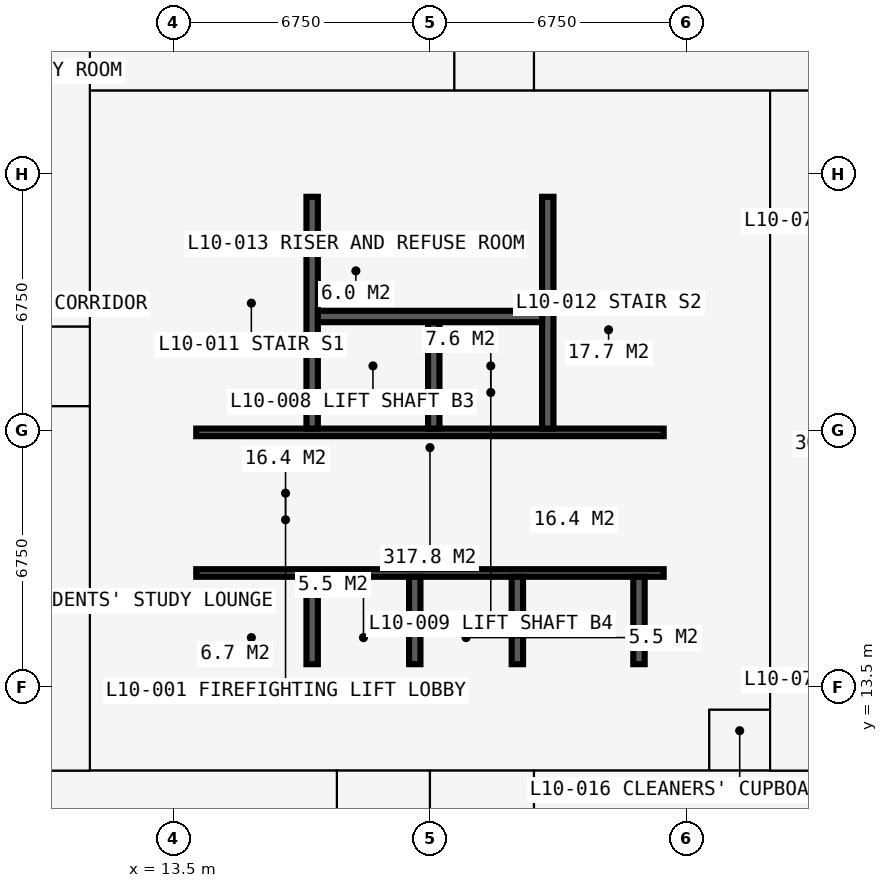
"""IFC4 building model, lengths in metres.
Left out: names, types, materials, properties, quantities, classifications, styles, units other than length and angle.
Written with IfcOpenShell. Run it as: python <this file> out.ifc"""

import sys

from ifc_helpers import new_model, si_unit, direction, frame, frame_2d, origin, place, context, subcontext, project, spatial, rectangle, extrude, element, fill, save


model = new_model("IFC4")
c1 = context("Model", 3, precision=1e-05, world=origin(), true_north=direction((0.0, 1.0)))
c2 = subcontext(c1, "Body", "Model", "MODEL_VIEW")
j1 = project(units=[si_unit("LENGTHUNIT", "METRE"), si_unit("PLANEANGLEUNIT", "RADIAN")], contexts=[c1])
p1 = place(None, origin())
s1 = spatial("IfcSite", under=j1, at=p1, CompositionType="ELEMENT")
p2 = place(p1, origin())
s2 = spatial("IfcBuilding", under=s1, at=p2, CompositionType="ELEMENT")
p3 = place(p2, frame((0.0, 0.0, 39.6)))
s3 = spatial("IfcBuildingStorey", under=s2, at=p3, CompositionType="ELEMENT", Elevation=39.6)
p4 = place(p3, frame((12.9, 13.5, 0.0), z_axis=(0.0, 0.0, 1.0), x_axis=(1.0, 0.0, 0.0)))
e1 = element("IfcWall", 1, at=p4, inside=s3, PredefinedType="SHEAR", context=c2, shape_type="SweptSolid", body=[
    extrude(rectangle(XDim=14.7, YDim=1.2, at=frame_2d((7.35, 0.0))), origin(), (0.0, 0.0, 1.0), 3.6),
])
p5 = place(p3, frame((27.0, 14.1, 0.0), z_axis=(0.0, 0.0, 1.0), x_axis=(0.0, 1.0, 0.0)))
e2 = element("IfcWall", 2, at=p5, inside=s3, PredefinedType="SHEAR", context=c2, shape_type="SweptSolid", body=[
    extrude(rectangle(XDim=12.3, YDim=1.2, at=frame_2d((6.15, 0.0))), origin(), (0.0, 0.0, 1.0), 3.6),
])
p6 = place(p5, frame((3.65, 0.0, 0.0)))
e3 = element("IfcOpeningElement", 3, at=p6, cuts=e2, PredefinedType="OPENING", context=c2, shape_type="SweptSolid", body=[
    extrude(rectangle(XDim=1.2, YDim=2.2, at=frame_2d((0.6, 1.1))), frame((0.0, 0.61, 0.0), z_axis=(0.0, -1.0, 0.0), x_axis=(1.0, 0.0, 0.0)), (0.0, 0.0, 1.0), 1.22),
])
p7 = place(p3, frame((27.6, 27.0, 0.0), z_axis=(0.0, 0.0, 1.0), x_axis=(-1.0, 0.0, 0.0)))
e4 = element("IfcWall", 4, at=p7, inside=s3, PredefinedType="SHEAR", context=c2, shape_type="SweptSolid", body=[
    extrude(rectangle(XDim=14.7, YDim=1.2, at=frame_2d((7.35, 0.0))), origin(), (0.0, 0.0, 1.0), 3.6),
])
p8 = place(p7, frame((5.225, 0.0, 0.0)))
e5 = element("IfcOpeningElement", 5, at=p8, cuts=e4, PredefinedType="OPENING", context=c2, shape_type="SweptSolid", body=[
    extrude(rectangle(XDim=0.9, YDim=2.2, at=frame_2d((0.45, 1.1))), frame((0.0, 0.61, 0.0), z_axis=(0.0, -1.0, 0.0), x_axis=(1.0, 0.0, 0.0)), (0.0, 0.0, 1.0), 1.22),
])
p9 = place(p7, frame((8.2, 0.0, 0.0)))
e6 = element("IfcOpeningElement", 6, at=p9, cuts=e4, PredefinedType="OPENING", context=c2, shape_type="SweptSolid", body=[
    extrude(rectangle(XDim=1.0, YDim=2.2, at=frame_2d((0.5, 1.1))), frame((0.0, 0.61, 0.0), z_axis=(0.0, -1.0, 0.0), x_axis=(1.0, 0.0, 0.0)), (0.0, 0.0, 1.0), 1.22),
])
p10 = place(p3, frame((13.5, 26.4, 0.0), z_axis=(0.0, 0.0, 1.0), x_axis=(0.0, -1.0, 0.0)))
e7 = element("IfcWall", 7, at=p10, inside=s3, PredefinedType="SHEAR", context=c2, shape_type="SweptSolid", body=[
    extrude(rectangle(XDim=12.3, YDim=1.2, at=frame_2d((6.15, 0.0))), origin(), (0.0, 0.0, 1.0), 3.6),
])
p11 = place(p10, frame((7.45, 0.0, 0.0)))
e8 = element("IfcOpeningElement", 8, at=p11, cuts=e7, PredefinedType="OPENING", context=c2, shape_type="SweptSolid", body=[
    extrude(rectangle(XDim=1.2, YDim=2.2, at=frame_2d((0.6, 1.1))), frame((0.0, 0.61, 0.0), z_axis=(0.0, -1.0, 0.0), x_axis=(1.0, 0.0, 0.0)), (0.0, 0.0, 1.0), 1.22),
])
p12 = place(p3, frame((14.1, 16.5, 0.0), z_axis=(0.0, 0.0, 1.0), x_axis=(1.0, 0.0, 0.0)))
e9 = element("IfcWall", 9, at=p12, inside=s3, PredefinedType="SHEAR", context=c2, shape_type="SweptSolid", body=[
    extrude(rectangle(XDim=12.3, YDim=0.2, at=frame_2d((6.15, 0.0))), origin(), (0.0, 0.0, 1.0), 3.6),
])
p13 = place(p12, frame((0.9, 0.0, 0.0)))
e10 = element("IfcOpeningElement", 10, at=p13, cuts=e9, PredefinedType="OPENING", context=c2, shape_type="SweptSolid", body=[
    extrude(rectangle(XDim=1.1, YDim=2.2, at=frame_2d((0.55, 1.1))), frame((0.0, 0.11, 0.0), z_axis=(0.0, -1.0, 0.0), x_axis=(1.0, 0.0, 0.0)), (0.0, 0.0, 1.0), 0.22),
])
p14 = place(p12, frame((9.5, 0.0, 0.0)))
e11 = element("IfcOpeningElement", 11, at=p14, cuts=e9, PredefinedType="OPENING", context=c2, shape_type="SweptSolid", body=[
    extrude(rectangle(XDim=1.1, YDim=2.2, at=frame_2d((0.55, 1.1))), frame((0.0, 0.11, 0.0), z_axis=(0.0, -1.0, 0.0), x_axis=(1.0, 0.0, 0.0)), (0.0, 0.0, 1.0), 0.22),
])
p15 = place(p3, frame((14.1, 20.2, 0.0), z_axis=(0.0, 0.0, 1.0), x_axis=(1.0, 0.0, 0.0)))
e12 = element("IfcWall", 12, at=p15, inside=s3, PredefinedType="SHEAR", context=c2, shape_type="SweptSolid", body=[
    extrude(rectangle(XDim=12.3, YDim=0.2, at=frame_2d((6.15, 0.0))), origin(), (0.0, 0.0, 1.0), 3.6),
])
p16 = place(p15, frame((0.35, 0.0, 0.0)))
e13 = element("IfcOpeningElement", 13, at=p16, cuts=e12, PredefinedType="OPENING", context=c2, shape_type="SweptSolid", body=[
    extrude(rectangle(XDim=1.1, YDim=2.2, at=frame_2d((0.55, 1.1))), frame((0.0, 0.11, 0.0), z_axis=(0.0, -1.0, 0.0), x_axis=(1.0, 0.0, 0.0)), (0.0, 0.0, 1.0), 0.22),
])
p17 = place(p15, frame((9.75, 0.0, 0.0)))
e14 = element("IfcOpeningElement", 14, at=p17, cuts=e12, PredefinedType="OPENING", context=c2, shape_type="SweptSolid", body=[
    extrude(rectangle(XDim=1.1, YDim=2.2, at=frame_2d((0.55, 1.1))), frame((0.0, 0.11, 0.0), z_axis=(0.0, -1.0, 0.0), x_axis=(1.0, 0.0, 0.0)), (0.0, 0.0, 1.0), 0.22),
])
for number, where, z_axis, x_axis in (
    (15, (17.15, 20.3, 0.0), (0.0, 0.0, 1.0), (0.0, 1.0, 0.0)),
    (16, (23.35, 20.3, 0.0), (0.0, 0.0, 1.0), (0.0, 1.0, 0.0)),
):
    element("IfcWall", number, at=place(p3, frame(where, z_axis=z_axis, x_axis=x_axis)), inside=s3, PredefinedType="SHEAR", context=c2, shape_type="SweptSolid", body=[
        extrude(rectangle(XDim=6.1, YDim=0.3, at=frame_2d((3.05, 0.0))), origin(), (0.0, 0.0, 1.0), 3.6),
    ])
p18 = place(p3, frame((20.35, 20.3, 0.0), z_axis=(0.0, 0.0, 1.0), x_axis=(0.0, 1.0, 0.0)))
e17 = element("IfcWall", 17, at=p18, inside=s3, PredefinedType="SHEAR", context=c2, shape_type="SweptSolid", body=[
    extrude(rectangle(XDim=2.8, YDim=0.3, at=frame_2d((1.4, 0.0))), origin(), (0.0, 0.0, 1.0), 3.6),
])
p19 = place(p3, frame((17.3, 23.25, 0.0), z_axis=(0.0, 0.0, 1.0), x_axis=(1.0, 0.0, 0.0)))
e18 = element("IfcWall", 18, at=p19, inside=s3, PredefinedType="SHEAR", context=c2, shape_type="SweptSolid", body=[
    extrude(rectangle(XDim=5.9, YDim=0.3, at=frame_2d((2.95, 0.0))), origin(), (0.0, 0.0, 1.0), 3.6),
])
for number, where, z_axis, x_axis in (
    (19, (17.15, 14.1, 0.0), (0.0, 0.0, 1.0), (0.0, 1.0, 0.0)),
    (20, (19.85, 14.1, 0.0), (0.0, 0.0, 1.0), (0.0, 1.0, 0.0)),
    (21, (22.55, 14.1, 0.0), (0.0, 0.0, 1.0), (0.0, 1.0, 0.0)),
    (22, (25.75, 14.1, 0.0), (0.0, 0.0, 1.0), (0.0, 1.0, 0.0)),
):
    element("IfcWall", number, at=place(p3, frame(where, z_axis=z_axis, x_axis=x_axis)), inside=s3, PredefinedType="SHEAR", context=c2, shape_type="SweptSolid", body=[
        extrude(rectangle(XDim=2.3, YDim=0.3, at=frame_2d((1.15, 0.0))), origin(), (0.0, 0.0, 1.0), 3.6),
    ])
p20 = place(p3, frame((18.875, 16.6, 0.0), z_axis=(0.0, 0.0, 1.0), x_axis=(0.0, 1.0, 0.0)))
e23 = element("IfcWall", 23, at=p20, inside=s3, PredefinedType="PARTITIONING", context=c2, shape_type="SweptSolid", body=[
    extrude(rectangle(XDim=3.5, YDim=0.15, at=frame_2d((1.75, 0.0))), origin(), (0.0, 0.0, 1.0), 3.375),
])
p21 = place(p20, frame((1.15, 0.0, 0.0)))
e24 = element("IfcOpeningElement", 24, at=p21, cuts=e23, PredefinedType="OPENING", context=c2, shape_type="SweptSolid", body=[
    extrude(rectangle(XDim=1.2, YDim=2.2, at=frame_2d((0.6, 1.1))), frame((0.0, 0.085, 0.0), z_axis=(0.0, -1.0, 0.0), x_axis=(1.0, 0.0, 0.0)), (0.0, 0.0, 1.0), 0.17),
])
p22 = place(p3, frame((21.625, 16.6, 0.0), z_axis=(0.0, 0.0, 1.0), x_axis=(0.0, 1.0, 0.0)))
e25 = element("IfcWall", 25, at=p22, inside=s3, PredefinedType="PARTITIONING", context=c2, shape_type="SweptSolid", body=[
    extrude(rectangle(XDim=3.5, YDim=0.15, at=frame_2d((1.75, 0.0))), origin(), (0.0, 0.0, 1.0), 3.375),
])
p23 = place(p22, frame((1.15, 0.0, 0.0)))
e26 = element("IfcOpeningElement", 26, at=p23, cuts=e25, PredefinedType="OPENING", context=c2, shape_type="SweptSolid", body=[
    extrude(rectangle(XDim=1.2, YDim=2.2, at=frame_2d((0.6, 1.1))), frame((0.0, 0.085, 0.0), z_axis=(0.0, -1.0, 0.0), x_axis=(1.0, 0.0, 0.0)), (0.0, 0.0, 1.0), 0.17),
])
p24 = place(p3, frame((19.375, 23.4, 0.0), z_axis=(0.0, 0.0, 1.0), x_axis=(0.0, 1.0, 0.0)))
e27 = element("IfcWall", 27, at=p24, inside=s3, PredefinedType="PARTITIONING", context=c2, shape_type="SweptSolid", body=[
    extrude(rectangle(XDim=3.0, YDim=0.15, at=frame_2d((1.5, 0.0))), origin(), (0.0, 0.0, 1.0), 3.375),
])
for number, where, z_axis, x_axis in (
    (28, (5.65, 20.887, 0.0), (0.0, 0.0, 1.0), (1.0, 0.0, 0.0)),
    (29, (5.65, 22.988, 0.0), (0.0, 0.0, 1.0), (1.0, 0.0, 0.0)),
):
    element("IfcWall", number, at=place(p3, frame(where, z_axis=z_axis, x_axis=x_axis)), inside=s3, PredefinedType="PARTITIONING", context=c2, shape_type="SweptSolid", body=[
        extrude(rectangle(XDim=5.65, YDim=0.15, at=frame_2d((2.825, 0.0))), origin(), (0.0, 0.0, 1.0), 3.375),
    ])
p25 = place(p3, frame((10.125, 11.3, 0.0), z_axis=(0.0, 0.0, 1.0), x_axis=(1.0, 0.0, 0.0)))
e30 = element("IfcWall", 30, at=p25, inside=s3, PredefinedType="PARTITIONING", context=c2, shape_type="SweptSolid", body=[
    extrude(rectangle(XDim=20.675, YDim=0.15, at=frame_2d((10.337, 0.0))), origin(), (0.0, 0.0, 1.0), 3.375),
])
p26 = place(p25, frame((8.375, 0.0, 0.0)))
e31 = element("IfcOpeningElement", 31, at=p26, cuts=e30, PredefinedType="OPENING", context=c2, shape_type="SweptSolid", body=[
    extrude(rectangle(XDim=1.0, YDim=2.2, at=frame_2d((0.5, 1.1))), frame((0.0, 0.085, 0.0), z_axis=(0.0, -1.0, 0.0), x_axis=(1.0, 0.0, 0.0)), (0.0, 0.0, 1.0), 0.17),
])
p27 = place(p25, frame((10.975, 0.0, 0.0)))
e32 = element("IfcOpeningElement", 32, at=p27, cuts=e30, PredefinedType="OPENING", context=c2, shape_type="SweptSolid", body=[
    extrude(rectangle(XDim=1.0, YDim=2.2, at=frame_2d((0.5, 1.1))), frame((0.0, 0.085, 0.0), z_axis=(0.0, -1.0, 0.0), x_axis=(1.0, 0.0, 0.0)), (0.0, 0.0, 1.0), 0.17),
])
p28 = place(p25, frame((3.925, 0.0, 0.0)))
e33 = element("IfcOpeningElement", 33, at=p28, cuts=e30, PredefinedType="OPENING", context=c2, shape_type="SweptSolid", body=[
    extrude(rectangle(XDim=0.95, YDim=2.2, at=frame_2d((0.475, 1.1))), frame((0.0, 0.085, 0.0), z_axis=(0.0, -1.0, 0.0), x_axis=(1.0, 0.0, 0.0)), (0.0, 0.0, 1.0), 0.17),
])
p29 = place(p3, frame((11.3, 11.3, 0.0), z_axis=(0.0, 0.0, 1.0), x_axis=(0.0, 1.0, 0.0)))
e34 = element("IfcWall", 34, at=p29, inside=s3, PredefinedType="PARTITIONING", context=c2, shape_type="SweptSolid", body=[
    extrude(rectangle(XDim=19.075, YDim=0.15, at=frame_2d((9.538, 0.0))), origin(), (0.0, 0.0, 1.0), 3.375),
])
p30 = place(p29, frame((10.137, 0.0, 0.0)))
e35 = element("IfcOpeningElement", 35, at=p30, cuts=e34, PredefinedType="OPENING", context=c2, shape_type="SweptSolid", body=[
    extrude(rectangle(XDim=1.0, YDim=2.2, at=frame_2d((0.5, 1.1))), frame((0.0, 0.085, 0.0), z_axis=(0.0, -1.0, 0.0), x_axis=(1.0, 0.0, 0.0)), (0.0, 0.0, 1.0), 0.17),
])
p31 = place(p3, frame((11.3, 29.2, 0.0), z_axis=(0.0, 0.0, 1.0), x_axis=(1.0, 0.0, 0.0)))
e36 = element("IfcWall", 36, at=p31, inside=s3, PredefinedType="PARTITIONING", context=c2, shape_type="SweptSolid", body=[
    extrude(rectangle(XDim=19.075, YDim=0.15, at=frame_2d((9.538, 0.0))), origin(), (0.0, 0.0, 1.0), 3.375),
])
p32 = place(p31, frame((10.137, 0.0, 0.0)))
e37 = element("IfcOpeningElement", 37, at=p32, cuts=e36, PredefinedType="OPENING", context=c2, shape_type="SweptSolid", body=[
    extrude(rectangle(XDim=1.0, YDim=2.2, at=frame_2d((0.5, 1.1))), frame((0.0, 0.085, 0.0), z_axis=(0.0, -1.0, 0.0), x_axis=(1.0, 0.0, 0.0)), (0.0, 0.0, 1.0), 0.17),
])
p33 = place(p3, frame((17.8, 5.65, 0.0), z_axis=(0.0, 0.0, 1.0), x_axis=(0.0, 1.0, 0.0)))
e38 = element("IfcWall", 38, at=p33, inside=s3, PredefinedType="PARTITIONING", context=c2, shape_type="SweptSolid", body=[
    extrude(rectangle(XDim=5.65, YDim=0.15, at=frame_2d((2.825, 0.0))), origin(), (0.0, 0.0, 1.0), 3.375),
])
p34 = place(p3, frame((20.25, -0.734, 0.0), z_axis=(0.0, 0.0, 1.0), x_axis=(0.0, 1.0, 0.0)))
e39 = element("IfcWall", 39, at=p34, inside=s3, PredefinedType="PARTITIONING", context=c2, shape_type="SweptSolid", body=[
    extrude(rectangle(XDim=12.034, YDim=0.15, at=frame_2d((6.017, 0.0))), origin(), (0.0, 0.0, 1.0), 2.61),
])
for number, where, z_axis, x_axis in (
    (40, (20.887, 29.2, 0.0), (0.0, 0.0, 1.0), (0.0, 1.0, 0.0)),
    (41, (22.988, 5.65, 0.0), (0.0, 0.0, 1.0), (0.0, 1.0, 0.0)),
    (42, (22.988, 29.2, 0.0), (0.0, 0.0, 1.0), (0.0, 1.0, 0.0)),
):
    element("IfcWall", number, at=place(p3, frame(where, z_axis=z_axis, x_axis=x_axis)), inside=s3, PredefinedType="PARTITIONING", context=c2, shape_type="SweptSolid", body=[
        extrude(rectangle(XDim=5.65, YDim=0.15, at=frame_2d((2.825, 0.0))), origin(), (0.0, 0.0, 1.0), 3.375),
    ])
p35 = place(p3, frame((27.6, 11.3, 0.0), z_axis=(0.0, 0.0, 1.0), x_axis=(0.0, 1.0, 0.0)))
e43 = element("IfcWall", 43, at=p35, inside=s3, PredefinedType="PARTITIONING", context=c2, shape_type="SweptSolid", body=[
    extrude(rectangle(XDim=1.6, YDim=0.15, at=frame_2d((0.8, 0.0))), origin(), (0.0, 0.0, 1.0), 3.375),
])
p36 = place(p35, frame((0.3, 0.0, 0.0)))
e44 = element("IfcOpeningElement", 44, at=p36, cuts=e43, PredefinedType="OPENING", context=c2, shape_type="SweptSolid", body=[
    extrude(rectangle(XDim=0.95, YDim=2.2, at=frame_2d((0.475, 1.1))), frame((0.0, 0.085, 0.0), z_axis=(0.0, -1.0, 0.0), x_axis=(1.0, 0.0, 0.0)), (0.0, 0.0, 1.0), 0.17),
])
p37 = place(p3, frame((27.6, 12.9, 0.0), z_axis=(0.0, 0.0, 1.0), x_axis=(1.0, 0.0, 0.0)))
e45 = element("IfcWall", 45, at=p37, inside=s3, PredefinedType="PARTITIONING", context=c2, shape_type="SweptSolid", body=[
    extrude(rectangle(XDim=1.6, YDim=0.15, at=frame_2d((0.8, 0.0))), origin(), (0.0, 0.0, 1.0), 2.877),
])
p38 = place(p3, frame((29.2, 11.3, 0.0), z_axis=(0.0, 0.0, 1.0), x_axis=(0.0, 1.0, 0.0)))
e46 = element("IfcWall", 46, at=p38, inside=s3, PredefinedType="PARTITIONING", context=c2, shape_type="SweptSolid", body=[
    extrude(rectangle(XDim=17.9, YDim=0.2, at=frame_2d((8.95, 0.0))), origin(), (0.0, 0.0, 1.0), 3.375),
])
p39 = place(p38, frame((8.35, 0.0, 0.0)))
e47 = element("IfcOpeningElement", 47, at=p39, cuts=e46, PredefinedType="OPENING", context=c2, shape_type="SweptSolid", body=[
    extrude(rectangle(XDim=1.2, YDim=2.2, at=frame_2d((0.6, 1.1))), frame((0.0, 0.11, 0.0), z_axis=(0.0, -1.0, 0.0), x_axis=(1.0, 0.0, 0.0)), (0.0, 0.0, 1.0), 0.22),
])
p40 = place(p3, frame((29.2, 25.7, 0.0), z_axis=(0.0, 0.0, 1.0), x_axis=(1.0, 0.0, 0.0)))
e48 = element("IfcWall", 48, at=p40, inside=s3, PredefinedType="SHEAR", context=c2, shape_type="SweptSolid", body=[
    extrude(rectangle(XDim=3.45, YDim=0.1, at=frame_2d((1.725, 0.0))), origin(), (0.0, 0.0, 1.0), 3.375),
])
p41 = place(p13, origin())
e49 = element("IfcDoor", 49, at=p41, inside=s3, OperationType="DOUBLE_DOOR_SLIDING", PredefinedType="DOOR", context=c2, shape_type="SweptSolid", body=[
    extrude(rectangle(XDim=1.1, YDim=2.2, at=frame_2d((0.55, 1.1))), frame((0.0, 0.025, 0.0), z_axis=(0.0, -1.0, 0.0), x_axis=(1.0, 0.0, 0.0)), (0.0, 0.0, 1.0), 0.05),
])
fill(e10, e49)
p42 = place(p14, origin())
e50 = element("IfcDoor", 50, at=p42, inside=s3, OperationType="DOUBLE_DOOR_SLIDING", PredefinedType="DOOR", context=c2, shape_type="SweptSolid", body=[
    extrude(rectangle(XDim=1.1, YDim=2.2, at=frame_2d((0.55, 1.1))), frame((0.0, 0.025, 0.0), z_axis=(0.0, -1.0, 0.0), x_axis=(1.0, 0.0, 0.0)), (0.0, 0.0, 1.0), 0.05),
])
fill(e11, e50)
p43 = place(p11, origin())
e51 = element("IfcDoor", 51, at=p43, inside=s3, OperationType="DOUBLE_DOOR_SINGLE_SWING", PredefinedType="DOOR", context=c2, shape_type="SweptSolid", body=[
    extrude(rectangle(XDim=1.2, YDim=2.2, at=frame_2d((0.6, 1.1))), frame((0.0, 0.025, 0.0), z_axis=(0.0, -1.0, 0.0), x_axis=(1.0, 0.0, 0.0)), (0.0, 0.0, 1.0), 0.05),
])
fill(e8, e51)
p44 = place(p6, origin())
e52 = element("IfcDoor", 52, at=p44, inside=s3, OperationType="DOUBLE_DOOR_SINGLE_SWING", PredefinedType="DOOR", context=c2, shape_type="SweptSolid", body=[
    extrude(rectangle(XDim=1.2, YDim=2.2, at=frame_2d((0.6, 1.1))), frame((0.0, 0.025, 0.0), z_axis=(0.0, -1.0, 0.0), x_axis=(1.0, 0.0, 0.0)), (0.0, 0.0, 1.0), 0.05),
])
fill(e3, e52)
p45 = place(p21, origin())
e53 = element("IfcDoor", 53, at=p45, inside=s3, OperationType="DOUBLE_DOOR_SINGLE_SWING", PredefinedType="DOOR", context=c2, shape_type="SweptSolid", body=[
    extrude(rectangle(XDim=1.2, YDim=2.2, at=frame_2d((0.6, 1.1))), frame((0.0, 0.025, 0.0), z_axis=(0.0, -1.0, 0.0), x_axis=(1.0, 0.0, 0.0)), (0.0, 0.0, 1.0), 0.05),
])
fill(e24, e53)
p46 = place(p23, origin())
e54 = element("IfcDoor", 54, at=p46, inside=s3, OperationType="DOUBLE_DOOR_SINGLE_SWING", PredefinedType="DOOR", context=c2, shape_type="SweptSolid", body=[
    extrude(rectangle(XDim=1.2, YDim=2.2, at=frame_2d((0.6, 1.1))), frame((0.0, 0.025, 0.0), z_axis=(0.0, -1.0, 0.0), x_axis=(1.0, 0.0, 0.0)), (0.0, 0.0, 1.0), 0.05),
])
fill(e26, e54)
p47 = place(p8, origin())
e55 = element("IfcDoor", 55, at=p47, inside=s3, OperationType="SINGLE_SWING_LEFT", PredefinedType="DOOR", context=c2, shape_type="SweptSolid", body=[
    extrude(rectangle(XDim=0.9, YDim=2.2, at=frame_2d((0.45, 1.1))), frame((0.0, 0.4, 0.0), z_axis=(0.0, -1.0, 0.0), x_axis=(1.0, 0.0, 0.0)), (0.0, 0.0, 1.0), 0.8),
])
fill(e5, e55)
p48 = place(p9, origin())
e56 = element("IfcDoor", 56, at=p48, inside=s3, OperationType="SINGLE_SWING_LEFT", PredefinedType="DOOR", context=c2, shape_type="SweptSolid", body=[
    extrude(rectangle(XDim=1.0, YDim=2.2, at=frame_2d((0.5, 1.1))), frame((0.0, 0.025, 0.0), z_axis=(0.0, -1.0, 0.0), x_axis=(1.0, 0.0, 0.0)), (0.0, 0.0, 1.0), 0.05),
])
fill(e6, e56)
p49 = place(p16, origin())
e57 = element("IfcDoor", 57, at=p49, inside=s3, OperationType="SINGLE_SWING_LEFT", PredefinedType="DOOR", context=c2, shape_type="SweptSolid", body=[
    extrude(rectangle(XDim=1.1, YDim=2.2, at=frame_2d((0.55, 1.1))), frame((0.0, 0.025, 0.0), z_axis=(0.0, -1.0, 0.0), x_axis=(1.0, 0.0, 0.0)), (0.0, 0.0, 1.0), 0.05),
])
fill(e13, e57)
p50 = place(p17, origin())
e58 = element("IfcDoor", 58, at=p50, inside=s3, OperationType="SINGLE_SWING_LEFT", PredefinedType="DOOR", context=c2, shape_type="SweptSolid", body=[
    extrude(rectangle(XDim=1.1, YDim=2.2, at=frame_2d((0.55, 1.1))), frame((0.0, 0.025, 0.0), z_axis=(0.0, -1.0, 0.0), x_axis=(1.0, 0.0, 0.0)), (0.0, 0.0, 1.0), 0.05),
])
fill(e14, e58)
p51 = place(p36, origin())
e59 = element("IfcDoor", 59, at=p51, inside=s3, OperationType="SINGLE_SWING_LEFT", PredefinedType="DOOR", context=c2, shape_type="SweptSolid", body=[
    extrude(rectangle(XDim=0.95, YDim=2.2, at=frame_2d((0.475, 1.1))), frame((0.0, 0.025, 0.0), z_axis=(0.0, -1.0, 0.0), x_axis=(1.0, 0.0, 0.0)), (0.0, 0.0, 1.0), 0.05),
])
fill(e44, e59)
p52 = place(p26, origin())
e60 = element("IfcDoor", 60, at=p52, inside=s3, OperationType="SINGLE_SWING_LEFT", PredefinedType="DOOR", context=c2, shape_type="SweptSolid", body=[
    extrude(rectangle(XDim=1.0, YDim=2.2, at=frame_2d((0.5, 1.1))), frame((0.0, 0.025, 0.0), z_axis=(0.0, -1.0, 0.0), x_axis=(1.0, 0.0, 0.0)), (0.0, 0.0, 1.0), 0.05),
])
fill(e31, e60)
p53 = place(p27, origin())
e61 = element("IfcDoor", 61, at=p53, inside=s3, OperationType="SINGLE_SWING_LEFT", PredefinedType="DOOR", context=c2, shape_type="SweptSolid", body=[
    extrude(rectangle(XDim=1.0, YDim=2.2, at=frame_2d((0.5, 1.1))), frame((0.0, 0.025, 0.0), z_axis=(0.0, -1.0, 0.0), x_axis=(1.0, 0.0, 0.0)), (0.0, 0.0, 1.0), 0.05),
])
fill(e32, e61)
p54 = place(p28, origin())
e62 = element("IfcDoor", 62, at=p54, inside=s3, OperationType="SINGLE_SWING_LEFT", PredefinedType="DOOR", context=c2, shape_type="SweptSolid", body=[
    extrude(rectangle(XDim=0.95, YDim=2.2, at=frame_2d((0.475, 1.1))), frame((0.0, 0.025, 0.0), z_axis=(0.0, -1.0, 0.0), x_axis=(1.0, 0.0, 0.0)), (0.0, 0.0, 1.0), 0.05),
])
fill(e33, e62)
p55 = place(p32, origin())
e63 = element("IfcDoor", 63, at=p55, inside=s3, OperationType="SINGLE_SWING_LEFT", PredefinedType="DOOR", context=c2, shape_type="SweptSolid", body=[
    extrude(rectangle(XDim=1.0, YDim=2.2, at=frame_2d((0.5, 1.1))), frame((0.0, 0.025, 0.0), z_axis=(0.0, -1.0, 0.0), x_axis=(1.0, 0.0, 0.0)), (0.0, 0.0, 1.0), 0.05),
])
fill(e37, e63)
p56 = place(p30, origin())
e64 = element("IfcDoor", 64, at=p56, inside=s3, OperationType="SINGLE_SWING_LEFT", PredefinedType="DOOR", context=c2, shape_type="SweptSolid", body=[
    extrude(rectangle(XDim=1.0, YDim=2.2, at=frame_2d((0.5, 1.1))), frame((0.0, 0.025, 0.0), z_axis=(0.0, -1.0, 0.0), x_axis=(1.0, 0.0, 0.0)), (0.0, 0.0, 1.0), 0.05),
])
fill(e35, e64)
p57 = place(p39, origin())
e65 = element("IfcDoor", 65, at=p57, inside=s3, OperationType="DOUBLE_DOOR_SINGLE_SWING", PredefinedType="DOOR", context=c2, shape_type="SweptSolid", body=[
    extrude(rectangle(XDim=1.2, YDim=2.2, at=frame_2d((0.6, 1.1))), frame((0.0, 0.025, 0.0), z_axis=(0.0, -1.0, 0.0), x_axis=(1.0, 0.0, 0.0)), (0.0, 0.0, 1.0), 0.05),
])
fill(e47, e65)
save(model, sys.argv[1])
